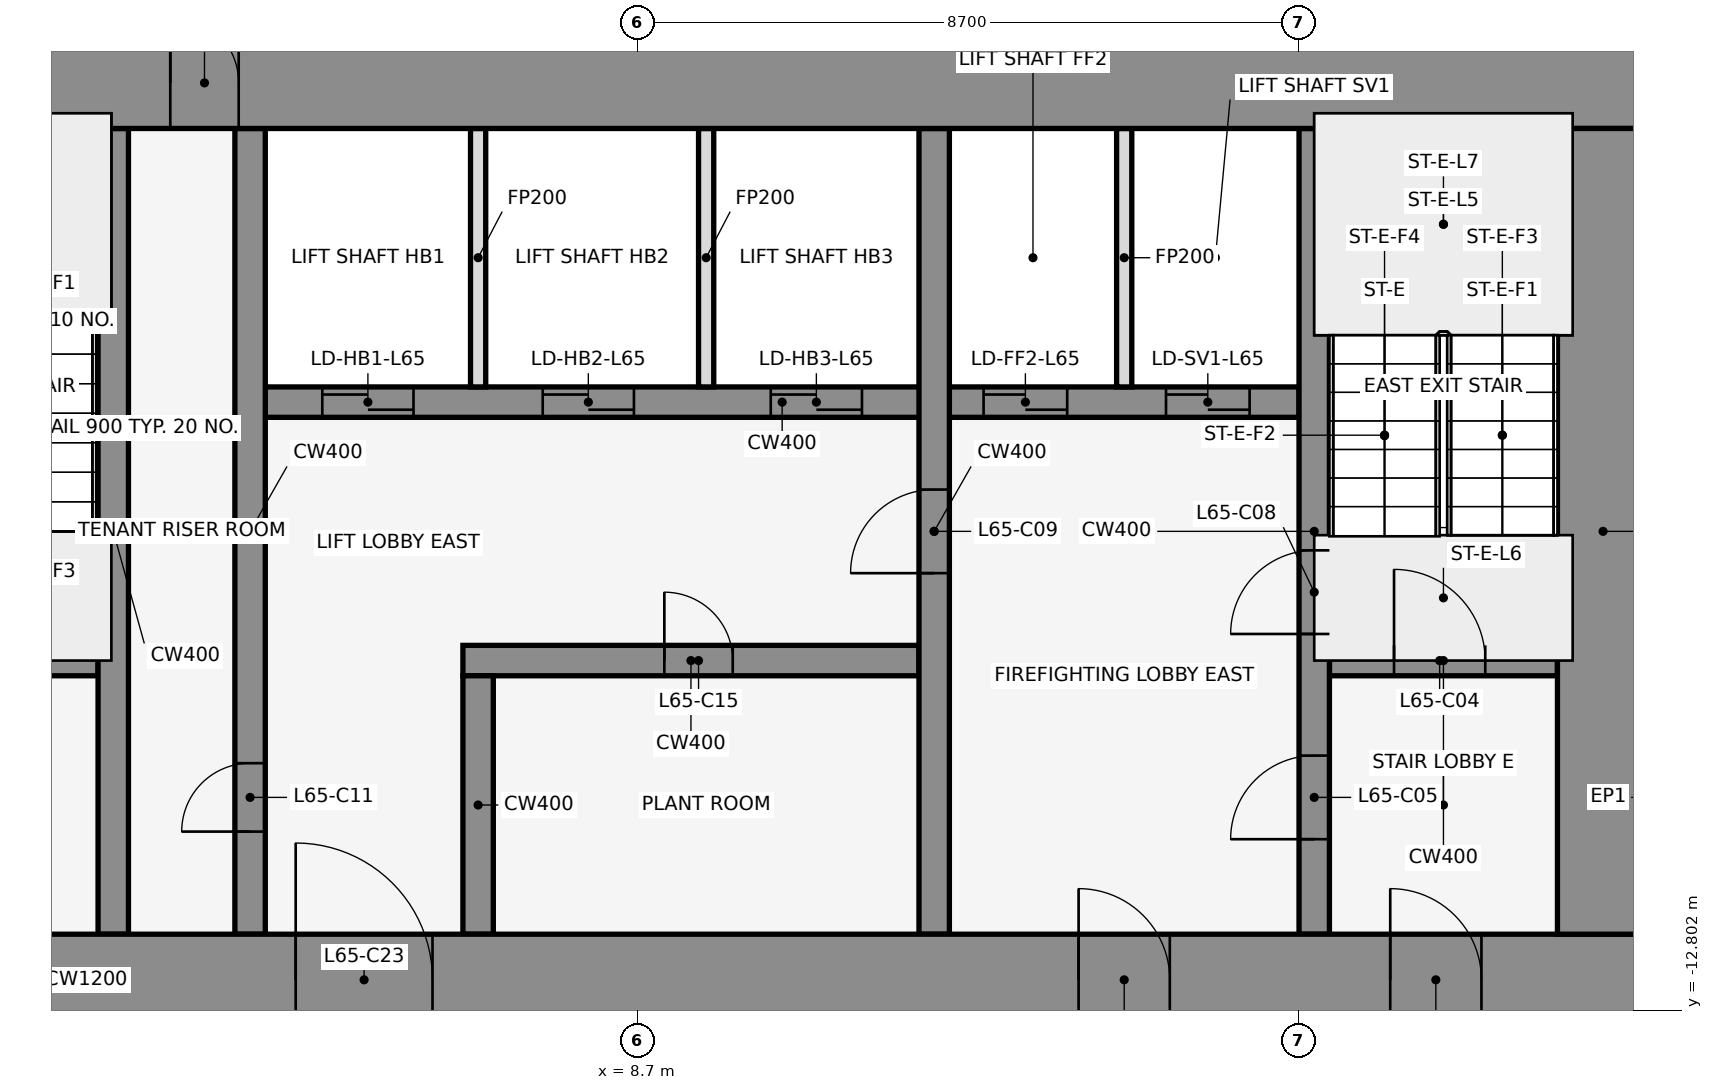
"""IFC4 building model, lengths in metres.
Left out: names, types, materials, properties, quantities, classifications, styles, units other than length and angle.
Written with IfcOpenShell. Run it as: python <this file> out.ifc"""

import sys

from ifc_helpers import new_model, si_unit, direction, frame, frame_2d, origin, place, context, subcontext, project, spatial, rectangle, extrude, element, fill, save


model = new_model("IFC4")
c1 = context("Model", 3, precision=1e-05, world=origin(), true_north=direction((0.0, 1.0)))
c2 = subcontext(c1, "Body", "Model", "MODEL_VIEW")
j1 = project(units=[si_unit("LENGTHUNIT", "METRE"), si_unit("PLANEANGLEUNIT", "RADIAN")], contexts=[c1])
p1 = place(None, origin())
s1 = spatial("IfcSite", under=j1, at=p1, CompositionType="ELEMENT")
p2 = place(p1, origin())
s2 = spatial("IfcBuilding", under=s1, at=p2, CompositionType="ELEMENT")
p3 = place(p2, frame((0.0, 0.0, 287.6)))
s3 = spatial("IfcBuildingStorey", under=s2, at=p3, CompositionType="ELEMENT", Elevation=287.6)
for number, where, z_axis, x_axis in (
    (1, (16.432, -0.105, 0.0), (0.0, 0.0, 1.0), (-0.84, 0.543, 0.0)),
    (2, (1.901, 1.08, 0.0), (0.0, 0.0, 1.0), (-0.84, -0.543, 0.0)),
):
    element("IfcWall", number, at=place(p3, frame(where, z_axis=z_axis, x_axis=x_axis)), inside=s3, PredefinedType="STANDARD", context=c2, shape_type="SweptSolid", body=[
        extrude(rectangle(XDim=2.183, YDim=0.25, at=frame_2d((1.091, 0.0))), origin(), (0.0, 0.0, 1.0), 5.25),
    ])
p4 = place(p3, frame((-1.6, -8.2, 0.0), z_axis=(0.0, 0.0, 1.0), x_axis=(1.0, 0.0, 0.0)))
e3 = element("IfcWall", 3, at=p4, inside=s3, PredefinedType="SHEAR", context=c2, shape_type="SweptSolid", body=[
    extrude(rectangle(XDim=3.2, YDim=0.4, at=frame_2d((1.6, 0.0))), origin(), (0.0, 0.0, 1.0), 5.4),
])
p5 = place(p4, frame((1.05, 0.0, 0.0)))
e4 = element("IfcOpeningElement", 4, at=p5, cuts=e3, PredefinedType="OPENING", context=c2, shape_type="SweptSolid", body=[
    extrude(rectangle(XDim=1.2, YDim=2.1, at=frame_2d((0.6, 1.05))), frame((0.0, 0.212, 0.0), z_axis=(0.0, -1.0, 0.0), x_axis=(1.0, 0.0, 0.0)), (0.0, 0.0, 1.0), 0.424),
])
p6 = place(p3, frame((6.4, -8.2, 0.0), z_axis=(0.0, 0.0, 1.0), x_axis=(1.0, 0.0, 0.0)))
e5 = element("IfcWall", 5, at=p6, inside=s3, PredefinedType="SHEAR", context=c2, shape_type="SweptSolid", body=[
    extrude(rectangle(XDim=6.0, YDim=0.4, at=frame_2d((3.0, 0.0))), origin(), (0.0, 0.0, 1.0), 5.4),
])
p7 = place(p6, frame((2.65, 0.0, 0.0)))
e6 = element("IfcOpeningElement", 6, at=p7, cuts=e5, PredefinedType="OPENING", context=c2, shape_type="SweptSolid", body=[
    extrude(rectangle(XDim=0.9, YDim=2.1, at=frame_2d((0.45, 1.05))), frame((0.0, 0.212, 0.0), z_axis=(0.0, -1.0, 0.0), x_axis=(1.0, 0.0, 0.0)), (0.0, 0.0, 1.0), 0.424),
])
p8 = place(p3, frame((17.8, -8.2, 0.0), z_axis=(0.0, 0.0, 1.0), x_axis=(1.0, 0.0, 0.0)))
e7 = element("IfcWall", 7, at=p8, inside=s3, PredefinedType="SHEAR", context=c2, shape_type="SweptSolid", body=[
    extrude(rectangle(XDim=3.0, YDim=0.4, at=frame_2d((1.5, 0.0))), origin(), (0.0, 0.0, 1.0), 5.4),
])
p9 = place(p8, frame((0.85, 0.0, 0.0)))
e8 = element("IfcOpeningElement", 8, at=p9, cuts=e7, PredefinedType="OPENING", context=c2, shape_type="SweptSolid", body=[
    extrude(rectangle(XDim=1.2, YDim=2.1, at=frame_2d((0.6, 1.05))), frame((0.0, 0.212, 0.0), z_axis=(0.0, -1.0, 0.0), x_axis=(1.0, 0.0, 0.0)), (0.0, 0.0, 1.0), 0.424),
])
p10 = place(p3, frame((3.8, -4.8, 0.0), z_axis=(0.0, 0.0, 1.0), x_axis=(1.0, 0.0, 0.0)))
e9 = element("IfcWall", 9, at=p10, inside=s3, PredefinedType="SHEAR", context=c2, shape_type="SweptSolid", body=[
    extrude(rectangle(XDim=13.6, YDim=0.4, at=frame_2d((6.8, 0.0))), origin(), (0.0, 0.0, 1.0), 5.4),
])
p11 = place(p10, frame((0.75, 0.0, 0.0)))
e10 = element("IfcOpeningElement", 10, at=p11, cuts=e9, PredefinedType="OPENING", context=c2, shape_type="SweptSolid", body=[
    extrude(rectangle(XDim=1.2, YDim=2.1, at=frame_2d((0.6, 1.05))), frame((0.0, 0.212, 0.0), z_axis=(0.0, -1.0, 0.0), x_axis=(1.0, 0.0, 0.0)), (0.0, 0.0, 1.0), 0.424),
])
p12 = place(p10, frame((3.65, 0.0, 0.0)))
e11 = element("IfcOpeningElement", 11, at=p12, cuts=e9, PredefinedType="OPENING", context=c2, shape_type="SweptSolid", body=[
    extrude(rectangle(XDim=1.2, YDim=2.1, at=frame_2d((0.6, 1.05))), frame((0.0, 0.212, 0.0), z_axis=(0.0, -1.0, 0.0), x_axis=(1.0, 0.0, 0.0)), (0.0, 0.0, 1.0), 0.424),
])
p13 = place(p10, frame((6.65, 0.0, 0.0)))
e12 = element("IfcOpeningElement", 12, at=p13, cuts=e9, PredefinedType="OPENING", context=c2, shape_type="SweptSolid", body=[
    extrude(rectangle(XDim=1.2, YDim=2.1, at=frame_2d((0.6, 1.05))), frame((0.0, 0.212, 0.0), z_axis=(0.0, -1.0, 0.0), x_axis=(1.0, 0.0, 0.0)), (0.0, 0.0, 1.0), 0.424),
])
p14 = place(p10, frame((9.45, 0.0, 0.0)))
e13 = element("IfcOpeningElement", 13, at=p14, cuts=e9, PredefinedType="OPENING", context=c2, shape_type="SweptSolid", body=[
    extrude(rectangle(XDim=1.1, YDim=2.1, at=frame_2d((0.55, 1.05))), frame((0.0, 0.212, 0.0), z_axis=(0.0, -1.0, 0.0), x_axis=(1.0, 0.0, 0.0)), (0.0, 0.0, 1.0), 0.424),
])
p15 = place(p10, frame((11.85, 0.0, 0.0)))
e14 = element("IfcOpeningElement", 14, at=p15, cuts=e9, PredefinedType="OPENING", context=c2, shape_type="SweptSolid", body=[
    extrude(rectangle(XDim=1.1, YDim=2.1, at=frame_2d((0.55, 1.05))), frame((0.0, 0.212, 0.0), z_axis=(0.0, -1.0, 0.0), x_axis=(1.0, 0.0, 0.0)), (0.0, 0.0, 1.0), 0.424),
])
p16 = place(p3, frame((1.8, -11.8, 0.0), z_axis=(0.0, 0.0, 1.0), x_axis=(0.0, 1.0, 0.0)))
e15 = element("IfcWall", 15, at=p16, inside=s3, PredefinedType="SHEAR", context=c2, shape_type="SweptSolid", body=[
    extrude(rectangle(XDim=10.6, YDim=0.4, at=frame_2d((5.3, 0.0))), origin(), (0.0, 0.0, 1.0), 5.4),
])
p17 = place(p3, frame((3.6, -11.8, 0.0), z_axis=(0.0, 0.0, 1.0), x_axis=(0.0, 1.0, 0.0)))
e16 = element("IfcWall", 16, at=p17, inside=s3, PredefinedType="SHEAR", context=c2, shape_type="SweptSolid", body=[
    extrude(rectangle(XDim=10.6, YDim=0.4, at=frame_2d((5.3, 0.0))), origin(), (0.0, 0.0, 1.0), 5.4),
])
p18 = place(p17, frame((1.35, 0.0, 0.0)))
e17 = element("IfcOpeningElement", 17, at=p18, cuts=e16, PredefinedType="OPENING", context=c2, shape_type="SweptSolid", body=[
    extrude(rectangle(XDim=0.9, YDim=2.1, at=frame_2d((0.45, 1.05))), frame((0.0, 0.212, 0.0), z_axis=(0.0, -1.0, 0.0), x_axis=(1.0, 0.0, 0.0)), (0.0, 0.0, 1.0), 0.424),
])
p19 = place(p3, frame((6.6, -11.8, 0.0), z_axis=(0.0, 0.0, 1.0), x_axis=(0.0, 1.0, 0.0)))
e18 = element("IfcWall", 18, at=p19, inside=s3, PredefinedType="SHEAR", context=c2, shape_type="SweptSolid", body=[
    extrude(rectangle(XDim=3.4, YDim=0.4, at=frame_2d((1.7, 0.0))), origin(), (0.0, 0.0, 1.0), 5.4),
])
for number, where, z_axis, x_axis in (
    (19, (6.6, -4.6, 0.0), (0.0, 0.0, 1.0), (0.0, 1.0, 0.0)),
    (20, (9.6, -4.6, 0.0), (0.0, 0.0, 1.0), (0.0, 1.0, 0.0)),
):
    element("IfcWall", number, at=place(p3, frame(where, z_axis=z_axis, x_axis=x_axis)), inside=s3, PredefinedType="PARTITIONING", context=c2, shape_type="SweptSolid", body=[
        extrude(rectangle(XDim=3.4, YDim=0.2, at=frame_2d((1.7, 0.0))), origin(), (0.0, 0.0, 1.0), 4.318),
    ])
p20 = place(p3, frame((12.6, -11.8, 0.0), z_axis=(0.0, 0.0, 1.0), x_axis=(0.0, 1.0, 0.0)))
e21 = element("IfcWall", 21, at=p20, inside=s3, PredefinedType="SHEAR", context=c2, shape_type="SweptSolid", body=[
    extrude(rectangle(XDim=10.6, YDim=0.4, at=frame_2d((5.3, 0.0))), origin(), (0.0, 0.0, 1.0), 5.4),
])
p21 = place(p20, frame((4.75, 0.0, 0.0)))
e22 = element("IfcOpeningElement", 22, at=p21, cuts=e21, PredefinedType="OPENING", context=c2, shape_type="SweptSolid", body=[
    extrude(rectangle(XDim=1.1, YDim=2.1, at=frame_2d((0.55, 1.05))), frame((0.0, 0.212, 0.0), z_axis=(0.0, -1.0, 0.0), x_axis=(1.0, 0.0, 0.0)), (0.0, 0.0, 1.0), 0.424),
])
p22 = place(p3, frame((15.1, -4.6, 0.0), z_axis=(0.0, 0.0, 1.0), x_axis=(0.0, 1.0, 0.0)))
e23 = element("IfcWall", 23, at=p22, inside=s3, PredefinedType="PARTITIONING", context=c2, shape_type="SweptSolid", body=[
    extrude(rectangle(XDim=3.4, YDim=0.2, at=frame_2d((1.7, 0.0))), origin(), (0.0, 0.0, 1.0), 4.318),
])
p23 = place(p3, frame((17.6, -11.8, 0.0), z_axis=(0.0, 0.0, 1.0), x_axis=(0.0, 1.0, 0.0)))
e24 = element("IfcWall", 24, at=p23, inside=s3, PredefinedType="SHEAR", context=c2, shape_type="SweptSolid", body=[
    extrude(rectangle(XDim=10.6, YDim=0.4, at=frame_2d((5.3, 0.0))), origin(), (0.0, 0.0, 1.0), 5.4),
])
p24 = place(p23, frame((1.25, 0.0, 0.0)))
e25 = element("IfcOpeningElement", 25, at=p24, cuts=e24, PredefinedType="OPENING", context=c2, shape_type="SweptSolid", body=[
    extrude(rectangle(XDim=1.1, YDim=2.1, at=frame_2d((0.55, 1.05))), frame((0.0, 0.212, 0.0), z_axis=(0.0, -1.0, 0.0), x_axis=(1.0, 0.0, 0.0)), (0.0, 0.0, 1.0), 0.424),
])
p25 = place(p23, frame((3.95, 0.0, 0.0)))
e26 = element("IfcOpeningElement", 26, at=p25, cuts=e24, PredefinedType="OPENING", context=c2, shape_type="SweptSolid", body=[
    extrude(rectangle(XDim=1.1, YDim=2.1, at=frame_2d((0.55, 1.05))), frame((0.0, 0.212, 0.0), z_axis=(0.0, -1.0, 0.0), x_axis=(1.0, 0.0, 0.0)), (0.0, 0.0, 1.0), 0.424),
])
p26 = place(p3, frame((-22.0, -0.6, 0.0), z_axis=(0.0, 0.0, 1.0), x_axis=(1.0, 0.0, 0.0)))
e27 = element("IfcWall", 27, at=p26, inside=s3, PredefinedType="SHEAR", context=c2, shape_type="SweptSolid", body=[
    extrude(rectangle(XDim=44.0, YDim=1.2, at=frame_2d((22.0, 0.0))), origin(), (0.0, 0.0, 1.0), 5.4),
])
p27 = place(p26, frame((18.55, 0.0, 0.0)))
e28 = element("IfcOpeningElement", 28, at=p27, cuts=e27, PredefinedType="OPENING", context=c2, shape_type="SweptSolid", body=[
    extrude(rectangle(XDim=0.9, YDim=2.1, at=frame_2d((0.45, 1.05))), frame((0.0, 0.612, 0.0), z_axis=(0.0, -1.0, 0.0), x_axis=(1.0, 0.0, 0.0)), (0.0, 0.0, 1.0), 1.224),
])
p28 = place(p26, frame((24.55, 0.0, 0.0)))
e29 = element("IfcOpeningElement", 29, at=p28, cuts=e27, PredefinedType="OPENING", context=c2, shape_type="SweptSolid", body=[
    extrude(rectangle(XDim=0.9, YDim=2.1, at=frame_2d((0.45, 1.05))), frame((0.0, 0.612, 0.0), z_axis=(0.0, -1.0, 0.0), x_axis=(1.0, 0.0, 0.0)), (0.0, 0.0, 1.0), 1.224),
])
p29 = place(p3, frame((-22.0, -12.4, 0.0), z_axis=(0.0, 0.0, 1.0), x_axis=(1.0, 0.0, 0.0)))
e30 = element("IfcWall", 30, at=p29, inside=s3, PredefinedType="SHEAR", context=c2, shape_type="SweptSolid", body=[
    extrude(rectangle(XDim=44.0, YDim=1.2, at=frame_2d((22.0, 0.0))), origin(), (0.0, 0.0, 1.0), 5.4),
])
p30 = place(p29, frame((2.2, 0.0, 0.0)))
e31 = element("IfcOpeningElement", 31, at=p30, cuts=e30, PredefinedType="OPENING", context=c2, shape_type="SweptSolid", body=[
    extrude(rectangle(XDim=1.2, YDim=2.1, at=frame_2d((0.6, 1.05))), frame((0.0, 0.612, 0.0), z_axis=(0.0, -1.0, 0.0), x_axis=(1.0, 0.0, 0.0)), (0.0, 0.0, 1.0), 1.224),
])
p31 = place(p29, frame((21.4, 0.0, 0.0)))
e32 = element("IfcOpeningElement", 32, at=p31, cuts=e30, PredefinedType="OPENING", context=c2, shape_type="SweptSolid", body=[
    extrude(rectangle(XDim=1.2, YDim=2.1, at=frame_2d((0.6, 1.05))), frame((0.0, 0.612, 0.0), z_axis=(0.0, -1.0, 0.0), x_axis=(1.0, 0.0, 0.0)), (0.0, 0.0, 1.0), 1.224),
])
p32 = place(p29, frame((40.6, 0.0, 0.0)))
e33 = element("IfcOpeningElement", 33, at=p32, cuts=e30, PredefinedType="OPENING", context=c2, shape_type="SweptSolid", body=[
    extrude(rectangle(XDim=1.2, YDim=2.1, at=frame_2d((0.6, 1.05))), frame((0.0, 0.612, 0.0), z_axis=(0.0, -1.0, 0.0), x_axis=(1.0, 0.0, 0.0)), (0.0, 0.0, 1.0), 1.224),
])
p33 = place(p29, frame((16.0, 0.0, 0.0)))
e34 = element("IfcOpeningElement", 34, at=p33, cuts=e30, PredefinedType="OPENING", context=c2, shape_type="SweptSolid", body=[
    extrude(rectangle(XDim=1.8, YDim=2.1, at=frame_2d((0.9, 1.05))), frame((0.0, 0.612, 0.0), z_axis=(0.0, -1.0, 0.0), x_axis=(1.0, 0.0, 0.0)), (0.0, 0.0, 1.0), 1.224),
])
p34 = place(p29, frame((6.3, 0.0, 0.0)))
e35 = element("IfcOpeningElement", 35, at=p34, cuts=e30, PredefinedType="OPENING", context=c2, shape_type="SweptSolid", body=[
    extrude(rectangle(XDim=1.2, YDim=2.1, at=frame_2d((0.6, 1.05))), frame((0.0, 0.612, 0.0), z_axis=(0.0, -1.0, 0.0), x_axis=(1.0, 0.0, 0.0)), (0.0, 0.0, 1.0), 1.224),
])
p35 = place(p29, frame((26.2, 0.0, 0.0)))
e36 = element("IfcOpeningElement", 36, at=p35, cuts=e30, PredefinedType="OPENING", context=c2, shape_type="SweptSolid", body=[
    extrude(rectangle(XDim=1.8, YDim=2.1, at=frame_2d((0.9, 1.05))), frame((0.0, 0.612, 0.0), z_axis=(0.0, -1.0, 0.0), x_axis=(1.0, 0.0, 0.0)), (0.0, 0.0, 1.0), 1.224),
])
p36 = place(p29, frame((36.5, 0.0, 0.0)))
e37 = element("IfcOpeningElement", 37, at=p36, cuts=e30, PredefinedType="OPENING", context=c2, shape_type="SweptSolid", body=[
    extrude(rectangle(XDim=1.2, YDim=2.1, at=frame_2d((0.6, 1.05))), frame((0.0, 0.612, 0.0), z_axis=(0.0, -1.0, 0.0), x_axis=(1.0, 0.0, 0.0)), (0.0, 0.0, 1.0), 1.224),
])
p37 = place(p3, frame((21.4, -11.8, 0.0), z_axis=(0.0, 0.0, 1.0), x_axis=(0.0, 1.0, 0.0)))
e38 = element("IfcWall", 38, at=p37, inside=s3, PredefinedType="SHEAR", context=c2, shape_type="SweptSolid", body=[
    extrude(rectangle(XDim=10.6, YDim=1.2, at=frame_2d((5.3, 0.0))), origin(), (0.0, 0.0, 1.0), 5.4),
])
p38 = place(p9, origin())
e39 = element("IfcDoor", 39, at=p38, inside=s3, OperationType="SINGLE_SWING_RIGHT", PredefinedType="DOOR", context=c2, shape_type="SweptSolid", body=[
    extrude(rectangle(XDim=1.2, YDim=2.1, at=frame_2d((0.6, 1.05))), frame((0.0, 0.025, 0.0), z_axis=(0.0, -1.0, 0.0), x_axis=(1.0, 0.0, 0.0)), (0.0, 0.0, 1.0), 0.05),
])
fill(e8, e39)
p39 = place(p24, origin())
e40 = element("IfcDoor", 40, at=p39, inside=s3, OperationType="SINGLE_SWING_LEFT", PredefinedType="DOOR", context=c2, shape_type="SweptSolid", body=[
    extrude(rectangle(XDim=1.1, YDim=2.1, at=frame_2d((0.55, 1.05))), frame((0.0, 0.025, 0.0), z_axis=(0.0, -1.0, 0.0), x_axis=(1.0, 0.0, 0.0)), (0.0, 0.0, 1.0), 0.05),
])
fill(e25, e40)
p40 = place(p11, origin())
e41 = element("IfcDoor", 41, at=p40, inside=s3, OperationType="DOUBLE_DOOR_SLIDING", PredefinedType="DOOR", context=c2, shape_type="SweptSolid", body=[
    extrude(rectangle(XDim=1.2, YDim=2.1, at=frame_2d((0.6, 1.05))), frame((0.0, 0.025, 0.0), z_axis=(0.0, -1.0, 0.0), x_axis=(1.0, 0.0, 0.0)), (0.0, 0.0, 1.0), 0.05),
])
fill(e10, e41)
p41 = place(p12, origin())
e42 = element("IfcDoor", 42, at=p41, inside=s3, OperationType="DOUBLE_DOOR_SLIDING", PredefinedType="DOOR", context=c2, shape_type="SweptSolid", body=[
    extrude(rectangle(XDim=1.2, YDim=2.1, at=frame_2d((0.6, 1.05))), frame((0.0, 0.025, 0.0), z_axis=(0.0, -1.0, 0.0), x_axis=(1.0, 0.0, 0.0)), (0.0, 0.0, 1.0), 0.05),
])
fill(e11, e42)
p42 = place(p13, origin())
e43 = element("IfcDoor", 43, at=p42, inside=s3, OperationType="DOUBLE_DOOR_SLIDING", PredefinedType="DOOR", context=c2, shape_type="SweptSolid", body=[
    extrude(rectangle(XDim=1.2, YDim=2.1, at=frame_2d((0.6, 1.05))), frame((0.0, 0.025, 0.0), z_axis=(0.0, -1.0, 0.0), x_axis=(1.0, 0.0, 0.0)), (0.0, 0.0, 1.0), 0.05),
])
fill(e12, e43)
p43 = place(p14, origin())
e44 = element("IfcDoor", 44, at=p43, inside=s3, OperationType="DOUBLE_DOOR_SLIDING", PredefinedType="DOOR", context=c2, shape_type="SweptSolid", body=[
    extrude(rectangle(XDim=1.1, YDim=2.1, at=frame_2d((0.55, 1.05))), frame((0.0, 0.025, 0.0), z_axis=(0.0, -1.0, 0.0), x_axis=(1.0, 0.0, 0.0)), (0.0, 0.0, 1.0), 0.05),
])
fill(e13, e44)
p44 = place(p15, origin())
e45 = element("IfcDoor", 45, at=p44, inside=s3, OperationType="DOUBLE_DOOR_SLIDING", PredefinedType="DOOR", context=c2, shape_type="SweptSolid", body=[
    extrude(rectangle(XDim=1.1, YDim=2.1, at=frame_2d((0.55, 1.05))), frame((0.0, 0.025, 0.0), z_axis=(0.0, -1.0, 0.0), x_axis=(1.0, 0.0, 0.0)), (0.0, 0.0, 1.0), 0.05),
])
fill(e14, e45)
p45 = place(p25, origin())
e46 = element("IfcDoor", 46, at=p45, inside=s3, OperationType="SINGLE_SWING_RIGHT", PredefinedType="DOOR", context=c2, shape_type="SweptSolid", body=[
    extrude(rectangle(XDim=1.1, YDim=2.1, at=frame_2d((0.55, 1.05))), frame((0.0, 0.025, 0.0), z_axis=(0.0, -1.0, 0.0), x_axis=(1.0, 0.0, 0.0)), (0.0, 0.0, 1.0), 0.05),
])
fill(e26, e46)
p46 = place(p21, frame((1.1, 0.0, 0.0), z_axis=(0.0, 0.0, 1.0), x_axis=(-1.0, 0.0, 0.0)))
e47 = element("IfcDoor", 47, at=p46, inside=s3, OperationType="SINGLE_SWING_RIGHT", PredefinedType="DOOR", context=c2, shape_type="SweptSolid", body=[
    extrude(rectangle(XDim=1.1, YDim=2.1, at=frame_2d((0.55, 1.05))), frame((0.0, 0.025, 0.0), z_axis=(0.0, -1.0, 0.0), x_axis=(1.0, 0.0, 0.0)), (0.0, 0.0, 1.0), 0.05),
])
fill(e22, e47)
p47 = place(p18, origin())
e48 = element("IfcDoor", 48, at=p47, inside=s3, OperationType="SINGLE_SWING_LEFT", PredefinedType="DOOR", context=c2, shape_type="SweptSolid", body=[
    extrude(rectangle(XDim=0.9, YDim=2.1, at=frame_2d((0.45, 1.05))), frame((0.0, 0.025, 0.0), z_axis=(0.0, -1.0, 0.0), x_axis=(1.0, 0.0, 0.0)), (0.0, 0.0, 1.0), 0.05),
])
fill(e17, e48)
p48 = place(p7, frame((0.9, 0.0, 0.0), z_axis=(0.0, 0.0, 1.0), x_axis=(-1.0, 0.0, 0.0)))
e49 = element("IfcDoor", 49, at=p48, inside=s3, OperationType="SINGLE_SWING_RIGHT", PredefinedType="DOOR", context=c2, shape_type="SweptSolid", body=[
    extrude(rectangle(XDim=0.9, YDim=2.1, at=frame_2d((0.45, 1.05))), frame((0.0, 0.025, 0.0), z_axis=(0.0, -1.0, 0.0), x_axis=(1.0, 0.0, 0.0)), (0.0, 0.0, 1.0), 0.05),
])
fill(e6, e49)
p49 = place(p28, origin())
e50 = element("IfcDoor", 50, at=p49, inside=s3, OperationType="SINGLE_SWING_LEFT", PredefinedType="DOOR", context=c2, shape_type="SweptSolid", body=[
    extrude(rectangle(XDim=0.9, YDim=2.1, at=frame_2d((0.45, 1.05))), frame((0.0, 0.025, 0.0), z_axis=(0.0, -1.0, 0.0), x_axis=(1.0, 0.0, 0.0)), (0.0, 0.0, 1.0), 0.05),
])
fill(e29, e50)
p50 = place(p32, frame((1.2, 0.0, 0.0), z_axis=(0.0, 0.0, 1.0), x_axis=(-1.0, 0.0, 0.0)))
e51 = element("IfcDoor", 51, at=p50, inside=s3, OperationType="SINGLE_SWING_RIGHT", PredefinedType="DOOR", context=c2, shape_type="SweptSolid", body=[
    extrude(rectangle(XDim=1.2, YDim=2.1, at=frame_2d((0.6, 1.05))), frame((0.0, 0.025, 0.0), z_axis=(0.0, -1.0, 0.0), x_axis=(1.0, 0.0, 0.0)), (0.0, 0.0, 1.0), 0.05),
])
fill(e33, e51)
p51 = place(p35, origin())
e52 = element("IfcDoor", 52, at=p51, inside=s3, OperationType="SINGLE_SWING_LEFT", PredefinedType="DOOR", context=c2, shape_type="SweptSolid", body=[
    extrude(rectangle(XDim=1.8, YDim=2.1, at=frame_2d((0.9, 1.05))), frame((0.0, 0.025, 0.0), z_axis=(0.0, -1.0, 0.0), x_axis=(1.0, 0.0, 0.0)), (0.0, 0.0, 1.0), 0.05),
])
fill(e36, e52)
p52 = place(p36, frame((1.2, 0.0, 0.0), z_axis=(0.0, 0.0, 1.0), x_axis=(-1.0, 0.0, 0.0)))
e53 = element("IfcDoor", 53, at=p52, inside=s3, OperationType="SINGLE_SWING_RIGHT", PredefinedType="DOOR", context=c2, shape_type="SweptSolid", body=[
    extrude(rectangle(XDim=1.2, YDim=2.1, at=frame_2d((0.6, 1.05))), frame((0.0, 0.025, 0.0), z_axis=(0.0, -1.0, 0.0), x_axis=(1.0, 0.0, 0.0)), (0.0, 0.0, 1.0), 0.05),
])
fill(e37, e53)
save(model, sys.argv[1])
